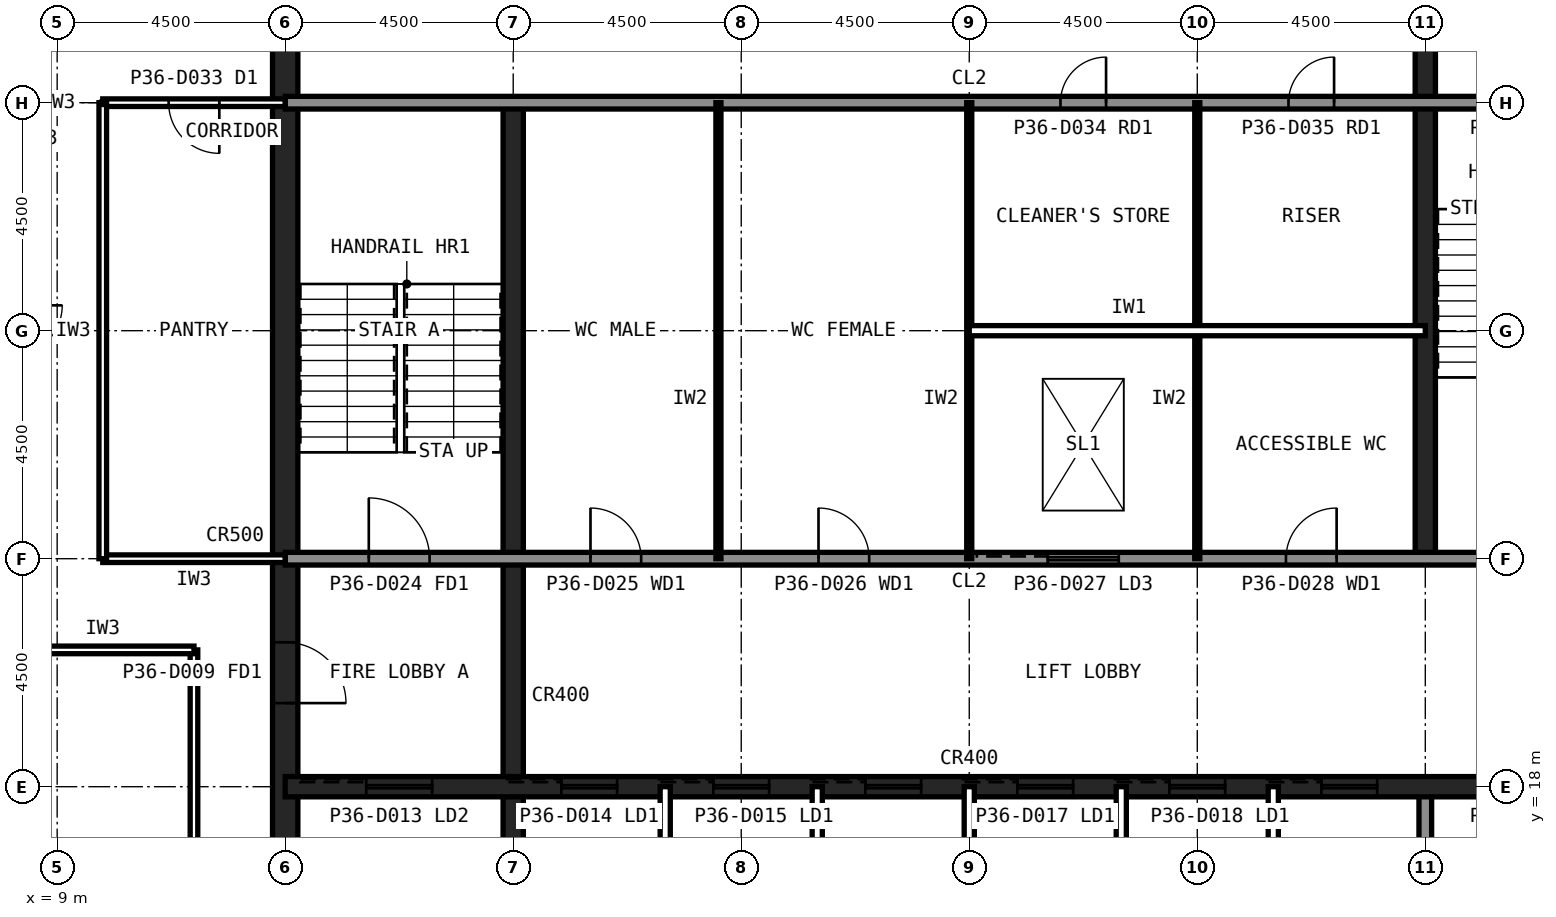
"""IFC4 building model, lengths in metres.
Left out: names, types, materials, properties, quantities, classifications, styles, units other than length and angle.
Written with IfcOpenShell. Run it as: python <this file> out.ifc"""

import sys

from ifc_helpers import new_model, si_unit, direction, frame, frame_2d, origin, place, context, subcontext, project, spatial, rectangle, extrude, element, fill, save


model = new_model("IFC4")
c1 = context("Model", 3, precision=1e-05, world=origin(), true_north=direction((0.0, 1.0)))
c2 = subcontext(c1, "Body", "Model", "MODEL_VIEW")
j1 = project(units=[si_unit("LENGTHUNIT", "METRE"), si_unit("PLANEANGLEUNIT", "RADIAN")], contexts=[c1])
p1 = place(None, origin())
s1 = spatial("IfcSite", under=j1, at=p1, CompositionType="ELEMENT")
p2 = place(p1, origin())
s2 = spatial("IfcBuilding", under=s1, at=p2, CompositionType="ELEMENT")
p3 = place(p2, frame((0.0, 0.0, 151.6)))
s3 = spatial("IfcBuildingStorey", under=s2, at=p3, CompositionType="ELEMENT", Elevation=151.6)
p4 = place(p3, frame((13.5, 40.5, 0.0), z_axis=(0.0, 0.0, 1.0), x_axis=(0.0, -1.0, 0.0)))
e1 = element("IfcWall", 1, at=p4, inside=s3, PredefinedType="SHEAR", context=c2, shape_type="SweptSolid", body=[
    extrude(rectangle(XDim=27.0, YDim=0.5, at=frame_2d((13.5, 0.0))), origin(), (0.0, 0.0, 1.0), 4.0),
])
p5 = place(p4, frame((19.65, 0.0, 0.0)))
e2 = element("IfcOpeningElement", 2, at=p5, cuts=e1, PredefinedType="OPENING", context=c2, shape_type="SweptSolid", body=[
    extrude(rectangle(XDim=1.2, YDim=2.1, at=frame_2d((0.6, 1.05))), frame((0.0, 0.26, 0.0), z_axis=(0.0, -1.0, 0.0), x_axis=(1.0, 0.0, 0.0)), (0.0, 0.0, 1.0), 0.52),
])
p6 = place(p4, frame((5.85, 0.0, 0.0)))
e3 = element("IfcOpeningElement", 3, at=p6, cuts=e1, PredefinedType="OPENING", context=c2, shape_type="SweptSolid", body=[
    extrude(rectangle(XDim=1.8, YDim=2.1, at=frame_2d((0.9, 1.05))), frame((0.0, 0.26, 0.0), z_axis=(0.0, -1.0, 0.0), x_axis=(1.0, 0.0, 0.0)), (0.0, 0.0, 1.0), 0.52),
])
p7 = place(p3, frame((18.0, 13.5, 0.0), z_axis=(0.0, 0.0, 1.0), x_axis=(0.0, 1.0, 0.0)))
e4 = element("IfcWall", 4, at=p7, inside=s3, PredefinedType="SHEAR", context=c2, shape_type="SweptSolid", body=[
    extrude(rectangle(XDim=18.0, YDim=0.4, at=frame_2d((9.0, 0.0))), origin(), (0.0, 0.0, 1.0), 4.0),
])
p8 = place(p3, frame((36.0, 13.5, 0.0), z_axis=(0.0, 0.0, 1.0), x_axis=(0.0, 1.0, 0.0)))
e5 = element("IfcWall", 5, at=p8, inside=s3, PredefinedType="SOLIDWALL", context=c2, shape_type="SweptSolid", body=[
    extrude(rectangle(XDim=4.5, YDim=0.25, at=frame_2d((2.25, 0.0))), origin(), (0.0, 0.0, 1.0), 3.84),
])
p9 = place(p3, frame((36.0, 22.5, 0.0), z_axis=(0.0, 0.0, 1.0), x_axis=(0.0, 1.0, 0.0)))
e6 = element("IfcWall", 6, at=p9, inside=s3, PredefinedType="SHEAR", context=c2, shape_type="SweptSolid", body=[
    extrude(rectangle(XDim=18.0, YDim=0.4, at=frame_2d((9.0, 0.0))), origin(), (0.0, 0.0, 1.0), 4.0),
])
p10 = place(p3, frame((13.5, 18.0, 0.0), z_axis=(0.0, 0.0, 1.0), x_axis=(1.0, 0.0, 0.0)))
e7 = element("IfcWall", 7, at=p10, inside=s3, PredefinedType="SHEAR", context=c2, shape_type="SweptSolid", body=[
    extrude(rectangle(XDim=27.0, YDim=0.4, at=frame_2d((13.5, 0.0))), origin(), (0.0, 0.0, 1.0), 4.0),
])
p11 = place(p10, frame((24.3, 0.0, 0.0)))
e8 = element("IfcOpeningElement", 8, at=p11, cuts=e7, PredefinedType="OPENING", context=c2, shape_type="SweptSolid", body=[
    extrude(rectangle(XDim=0.9, YDim=2.1, at=frame_2d((0.45, 1.05))), frame((0.0, 0.21, 0.0), z_axis=(0.0, -1.0, 0.0), x_axis=(1.0, 0.0, 0.0)), (0.0, 0.0, 1.0), 0.42),
])
p12 = place(p10, frame((5.45, 0.0, 0.0)))
e9 = element("IfcOpeningElement", 9, at=p12, cuts=e7, PredefinedType="OPENING", context=c2, shape_type="SweptSolid", body=[
    extrude(rectangle(XDim=1.1, YDim=2.1, at=frame_2d((0.55, 1.05))), frame((0.0, 0.21, 0.0), z_axis=(0.0, -1.0, 0.0), x_axis=(1.0, 0.0, 0.0)), (0.0, 0.0, 1.0), 0.42),
])
p13 = place(p10, frame((8.45, 0.0, 0.0)))
e10 = element("IfcOpeningElement", 10, at=p13, cuts=e7, PredefinedType="OPENING", context=c2, shape_type="SweptSolid", body=[
    extrude(rectangle(XDim=1.1, YDim=2.1, at=frame_2d((0.55, 1.05))), frame((0.0, 0.21, 0.0), z_axis=(0.0, -1.0, 0.0), x_axis=(1.0, 0.0, 0.0)), (0.0, 0.0, 1.0), 0.42),
])
p14 = place(p10, frame((11.45, 0.0, 0.0)))
e11 = element("IfcOpeningElement", 11, at=p14, cuts=e7, PredefinedType="OPENING", context=c2, shape_type="SweptSolid", body=[
    extrude(rectangle(XDim=1.1, YDim=2.1, at=frame_2d((0.55, 1.05))), frame((0.0, 0.21, 0.0), z_axis=(0.0, -1.0, 0.0), x_axis=(1.0, 0.0, 0.0)), (0.0, 0.0, 1.0), 0.42),
])
p15 = place(p10, frame((14.45, 0.0, 0.0)))
e12 = element("IfcOpeningElement", 12, at=p15, cuts=e7, PredefinedType="OPENING", context=c2, shape_type="SweptSolid", body=[
    extrude(rectangle(XDim=1.1, YDim=2.1, at=frame_2d((0.55, 1.05))), frame((0.0, 0.21, 0.0), z_axis=(0.0, -1.0, 0.0), x_axis=(1.0, 0.0, 0.0)), (0.0, 0.0, 1.0), 0.42),
])
p16 = place(p10, frame((17.45, 0.0, 0.0)))
e13 = element("IfcOpeningElement", 13, at=p16, cuts=e7, PredefinedType="OPENING", context=c2, shape_type="SweptSolid", body=[
    extrude(rectangle(XDim=1.1, YDim=2.1, at=frame_2d((0.55, 1.05))), frame((0.0, 0.21, 0.0), z_axis=(0.0, -1.0, 0.0), x_axis=(1.0, 0.0, 0.0)), (0.0, 0.0, 1.0), 0.42),
])
p17 = place(p10, frame((20.45, 0.0, 0.0)))
e14 = element("IfcOpeningElement", 14, at=p17, cuts=e7, PredefinedType="OPENING", context=c2, shape_type="SweptSolid", body=[
    extrude(rectangle(XDim=1.1, YDim=2.1, at=frame_2d((0.55, 1.05))), frame((0.0, 0.21, 0.0), z_axis=(0.0, -1.0, 0.0), x_axis=(1.0, 0.0, 0.0)), (0.0, 0.0, 1.0), 0.42),
])
p18 = place(p10, frame((1.6, 0.0, 0.0)))
e15 = element("IfcOpeningElement", 15, at=p18, cuts=e7, PredefinedType="OPENING", context=c2, shape_type="SweptSolid", body=[
    extrude(rectangle(XDim=1.3, YDim=2.2, at=frame_2d((0.65, 1.1))), frame((0.0, 0.21, 0.0), z_axis=(0.0, -1.0, 0.0), x_axis=(1.0, 0.0, 0.0)), (0.0, 0.0, 1.0), 0.42),
])
p19 = place(p3, frame((13.5, 22.5, 0.0), z_axis=(0.0, 0.0, 1.0), x_axis=(1.0, 0.0, 0.0)))
e16 = element("IfcWall", 16, at=p19, inside=s3, PredefinedType="SOLIDWALL", context=c2, shape_type="SweptSolid", body=[
    extrude(rectangle(XDim=27.0, YDim=0.25, at=frame_2d((13.5, 0.0))), origin(), (0.0, 0.0, 1.0), 3.84),
])
p20 = place(p19, frame((1.65, 0.0, 0.0)))
e17 = element("IfcOpeningElement", 17, at=p20, cuts=e16, PredefinedType="OPENING", context=c2, shape_type="SweptSolid", body=[
    extrude(rectangle(XDim=1.2, YDim=2.1, at=frame_2d((0.6, 1.05))), frame((0.0, 0.135, 0.0), z_axis=(0.0, -1.0, 0.0), x_axis=(1.0, 0.0, 0.0)), (0.0, 0.0, 1.0), 0.27),
])
p21 = place(p19, frame((6.025, 0.0, 0.0)))
e18 = element("IfcOpeningElement", 18, at=p21, cuts=e16, PredefinedType="OPENING", context=c2, shape_type="SweptSolid", body=[
    extrude(rectangle(XDim=1.0, YDim=2.1, at=frame_2d((0.5, 1.05))), frame((0.0, 0.135, 0.0), z_axis=(0.0, -1.0, 0.0), x_axis=(1.0, 0.0, 0.0)), (0.0, 0.0, 1.0), 0.27),
])
p22 = place(p19, frame((10.525, 0.0, 0.0)))
e19 = element("IfcOpeningElement", 19, at=p22, cuts=e16, PredefinedType="OPENING", context=c2, shape_type="SweptSolid", body=[
    extrude(rectangle(XDim=1.0, YDim=2.1, at=frame_2d((0.5, 1.05))), frame((0.0, 0.135, 0.0), z_axis=(0.0, -1.0, 0.0), x_axis=(1.0, 0.0, 0.0)), (0.0, 0.0, 1.0), 0.27),
])
p23 = place(p19, frame((19.75, 0.0, 0.0)))
e20 = element("IfcOpeningElement", 20, at=p23, cuts=e16, PredefinedType="OPENING", context=c2, shape_type="SweptSolid", body=[
    extrude(rectangle(XDim=1.0, YDim=2.1, at=frame_2d((0.5, 1.05))), frame((0.0, 0.135, 0.0), z_axis=(0.0, -1.0, 0.0), x_axis=(1.0, 0.0, 0.0)), (0.0, 0.0, 1.0), 0.27),
])
p24 = place(p19, frame((15.05, 0.0, 0.0)))
e21 = element("IfcOpeningElement", 21, at=p24, cuts=e16, PredefinedType="OPENING", context=c2, shape_type="SweptSolid", body=[
    extrude(rectangle(XDim=1.4, YDim=2.4, at=frame_2d((0.7, 1.2))), frame((0.0, 0.135, 0.0), z_axis=(0.0, -1.0, 0.0), x_axis=(1.0, 0.0, 0.0)), (0.0, 0.0, 1.0), 0.27),
])
p25 = place(p3, frame((13.5, 31.5, 0.0), z_axis=(0.0, 0.0, 1.0), x_axis=(1.0, 0.0, 0.0)))
e22 = element("IfcWall", 22, at=p25, inside=s3, PredefinedType="SOLIDWALL", context=c2, shape_type="SweptSolid", body=[
    extrude(rectangle(XDim=27.0, YDim=0.25, at=frame_2d((13.5, 0.0))), origin(), (0.0, 0.0, 1.0), 3.84),
])
p26 = place(p25, frame((24.15, 0.0, 0.0)))
e23 = element("IfcOpeningElement", 23, at=p26, cuts=e22, PredefinedType="OPENING", context=c2, shape_type="SweptSolid", body=[
    extrude(rectangle(XDim=1.2, YDim=2.1, at=frame_2d((0.6, 1.05))), frame((0.0, 0.135, 0.0), z_axis=(0.0, -1.0, 0.0), x_axis=(1.0, 0.0, 0.0)), (0.0, 0.0, 1.0), 0.27),
])
p27 = place(p25, frame((15.3, 0.0, 0.0)))
e24 = element("IfcOpeningElement", 24, at=p27, cuts=e22, PredefinedType="OPENING", context=c2, shape_type="SweptSolid", body=[
    extrude(rectangle(XDim=0.9, YDim=2.1, at=frame_2d((0.45, 1.05))), frame((0.0, 0.135, 0.0), z_axis=(0.0, -1.0, 0.0), x_axis=(1.0, 0.0, 0.0)), (0.0, 0.0, 1.0), 0.27),
])
p28 = place(p25, frame((19.8, 0.0, 0.0)))
e25 = element("IfcOpeningElement", 25, at=p28, cuts=e22, PredefinedType="OPENING", context=c2, shape_type="SweptSolid", body=[
    extrude(rectangle(XDim=0.9, YDim=2.1, at=frame_2d((0.45, 1.05))), frame((0.0, 0.135, 0.0), z_axis=(0.0, -1.0, 0.0), x_axis=(1.0, 0.0, 0.0)), (0.0, 0.0, 1.0), 0.27),
])
for number, where, z_axis, x_axis in (
    (26, (21.0, 13.5, 0.0), (0.0, 0.0, 1.0), (0.0, 1.0, 0.0)),
    (27, (24.0, 13.5, 0.0), (0.0, 0.0, 1.0), (0.0, 1.0, 0.0)),
    (28, (27.0, 13.5, 0.0), (0.0, 0.0, 1.0), (0.0, 1.0, 0.0)),
    (29, (30.0, 13.5, 0.0), (0.0, 0.0, 1.0), (0.0, 1.0, 0.0)),
    (30, (33.0, 13.5, 0.0), (0.0, 0.0, 1.0), (0.0, 1.0, 0.0)),
):
    element("IfcWall", number, at=place(p3, frame(where, z_axis=z_axis, x_axis=x_axis)), inside=s3, PredefinedType="PARTITIONING", context=c2, shape_type="SweptSolid", body=[
        extrude(rectangle(XDim=4.5, YDim=0.2, at=frame_2d((2.25, 0.0))), origin(), (0.0, 0.0, 1.0), 3.84),
    ])
for number, where, z_axis, x_axis in (
    (31, (22.05, 22.5, 0.0), (0.0, 0.0, 1.0), (0.0, 1.0, 0.0)),
    (32, (27.0, 22.5, 0.0), (0.0, 0.0, 1.0), (0.0, 1.0, 0.0)),
    (33, (31.5, 22.5, 0.0), (0.0, 0.0, 1.0), (0.0, 1.0, 0.0)),
):
    element("IfcWall", number, at=place(p3, frame(where, z_axis=z_axis, x_axis=x_axis)), inside=s3, PredefinedType="PLUMBINGWALL", context=c2, shape_type="SweptSolid", body=[
        extrude(rectangle(XDim=9.0, YDim=0.1, at=frame_2d((4.5, 0.0))), origin(), (0.0, 0.0, 1.0), 3.84),
    ])
p29 = place(p3, frame((27.0, 27.0, 0.0), z_axis=(0.0, 0.0, 1.0), x_axis=(1.0, 0.0, 0.0)))
e34 = element("IfcWall", 34, at=p29, inside=s3, PredefinedType="PARTITIONING", context=c2, shape_type="SweptSolid", body=[
    extrude(rectangle(XDim=9.0, YDim=0.2, at=frame_2d((4.5, 0.0))), origin(), (0.0, 0.0, 1.0), 3.84),
])
p30 = place(p3, frame((11.7, 20.7, 0.0), z_axis=(0.0, 0.0, 1.0), x_axis=(0.0, -1.0, 0.0)))
e35 = element("IfcWall", 35, at=p30, inside=s3, PredefinedType="PARTITIONING", context=c2, shape_type="SweptSolid", body=[
    extrude(rectangle(XDim=9.0, YDim=0.15, at=frame_2d((4.5, 0.0))), origin(), (0.0, 0.0, 1.0), 3.84),
])
p31 = place(p3, frame((8.1, 20.7, 0.0), z_axis=(0.0, 0.0, 1.0), x_axis=(1.0, 0.0, 0.0)))
e36 = element("IfcWall", 36, at=p31, inside=s3, PredefinedType="PARTITIONING", context=c2, shape_type="SweptSolid", body=[
    extrude(rectangle(XDim=3.6, YDim=0.15, at=frame_2d((1.8, 0.0))), origin(), (0.0, 0.0, 1.0), 3.84),
])
p32 = place(p3, frame((9.9, 22.5, 0.0), z_axis=(0.0, 0.0, 1.0), x_axis=(1.0, 0.0, 0.0)))
e37 = element("IfcWall", 37, at=p32, inside=s3, PredefinedType="PARTITIONING", context=c2, shape_type="SweptSolid", body=[
    extrude(rectangle(XDim=3.6, YDim=0.15, at=frame_2d((1.8, 0.0))), origin(), (0.0, 0.0, 1.0), 2.989),
])
p33 = place(p3, frame((13.5, 31.5, 0.0), z_axis=(0.0, 0.0, 1.0), x_axis=(-1.0, 0.0, 0.0)))
e38 = element("IfcWall", 38, at=p33, inside=s3, PredefinedType="PARTITIONING", context=c2, shape_type="SweptSolid", body=[
    extrude(rectangle(XDim=3.6, YDim=0.15, at=frame_2d((1.8, 0.0))), origin(), (0.0, 0.0, 1.0), 2.989),
])
p34 = place(p33, frame((1.3, 0.0, 0.0)))
e39 = element("IfcOpeningElement", 39, at=p34, cuts=e38, PredefinedType="OPENING", context=c2, shape_type="SweptSolid", body=[
    extrude(rectangle(XDim=1.0, YDim=2.1, at=frame_2d((0.5, 1.05))), frame((0.0, 0.085, 0.0), z_axis=(0.0, -1.0, 0.0), x_axis=(1.0, 0.0, 0.0)), (0.0, 0.0, 1.0), 0.17),
])
p35 = place(p3, frame((9.9, 31.5, 0.0), z_axis=(0.0, 0.0, 1.0), x_axis=(0.0, -1.0, 0.0)))
e40 = element("IfcWall", 40, at=p35, inside=s3, PredefinedType="PARTITIONING", context=c2, shape_type="SweptSolid", body=[
    extrude(rectangle(XDim=9.0, YDim=0.15, at=frame_2d((4.5, 0.0))), origin(), (0.0, 0.0, 1.0), 3.84),
])
p36 = place(p5, origin())
e41 = element("IfcDoor", 41, at=p36, inside=s3, OperationType="SINGLE_SWING_RIGHT", PredefinedType="DOOR", context=c2, shape_type="SweptSolid", body=[
    extrude(rectangle(XDim=1.2, YDim=2.1, at=frame_2d((0.6, 1.05))), frame((0.0, 0.025, 0.0), z_axis=(0.0, -1.0, 0.0), x_axis=(1.0, 0.0, 0.0)), (0.0, 0.0, 1.0), 0.05),
])
fill(e2, e41)
p37 = place(p20, origin())
e42 = element("IfcDoor", 42, at=p37, inside=s3, OperationType="SINGLE_SWING_LEFT", PredefinedType="DOOR", context=c2, shape_type="SweptSolid", body=[
    extrude(rectangle(XDim=1.2, YDim=2.1, at=frame_2d((0.6, 1.05))), frame((0.0, 0.025, 0.0), z_axis=(0.0, -1.0, 0.0), x_axis=(1.0, 0.0, 0.0)), (0.0, 0.0, 1.0), 0.05),
])
fill(e17, e42)
p38 = place(p21, origin())
e43 = element("IfcDoor", 43, at=p38, inside=s3, OperationType="SINGLE_SWING_LEFT", PredefinedType="DOOR", context=c2, shape_type="SweptSolid", body=[
    extrude(rectangle(XDim=1.0, YDim=2.1, at=frame_2d((0.5, 1.05))), frame((0.0, 0.025, 0.0), z_axis=(0.0, -1.0, 0.0), x_axis=(1.0, 0.0, 0.0)), (0.0, 0.0, 1.0), 0.05),
])
fill(e18, e43)
p39 = place(p22, origin())
e44 = element("IfcDoor", 44, at=p39, inside=s3, OperationType="SINGLE_SWING_LEFT", PredefinedType="DOOR", context=c2, shape_type="SweptSolid", body=[
    extrude(rectangle(XDim=1.0, YDim=2.1, at=frame_2d((0.5, 1.05))), frame((0.0, 0.025, 0.0), z_axis=(0.0, -1.0, 0.0), x_axis=(1.0, 0.0, 0.0)), (0.0, 0.0, 1.0), 0.05),
])
fill(e19, e44)
p40 = place(p23, origin())
e45 = element("IfcDoor", 45, at=p40, inside=s3, OperationType="SINGLE_SWING_RIGHT", PredefinedType="DOOR", context=c2, shape_type="SweptSolid", body=[
    extrude(rectangle(XDim=1.0, YDim=2.1, at=frame_2d((0.5, 1.05))), frame((0.0, 0.025, 0.0), z_axis=(0.0, -1.0, 0.0), x_axis=(1.0, 0.0, 0.0)), (0.0, 0.0, 1.0), 0.05),
])
fill(e20, e45)
p41 = place(p27, origin())
e46 = element("IfcDoor", 46, at=p41, inside=s3, OperationType="SINGLE_SWING_RIGHT", PredefinedType="DOOR", context=c2, shape_type="SweptSolid", body=[
    extrude(rectangle(XDim=0.9, YDim=2.1, at=frame_2d((0.45, 1.05))), frame((0.0, 0.025, 0.0), z_axis=(0.0, -1.0, 0.0), x_axis=(1.0, 0.0, 0.0)), (0.0, 0.0, 1.0), 0.05),
])
fill(e24, e46)
p42 = place(p28, origin())
e47 = element("IfcDoor", 47, at=p42, inside=s3, OperationType="SINGLE_SWING_RIGHT", PredefinedType="DOOR", context=c2, shape_type="SweptSolid", body=[
    extrude(rectangle(XDim=0.9, YDim=2.1, at=frame_2d((0.45, 1.05))), frame((0.0, 0.025, 0.0), z_axis=(0.0, -1.0, 0.0), x_axis=(1.0, 0.0, 0.0)), (0.0, 0.0, 1.0), 0.05),
])
fill(e25, e47)
p43 = place(p12, origin())
e48 = element("IfcDoor", 48, at=p43, inside=s3, OperationType="SLIDING_TO_LEFT", PredefinedType="DOOR", context=c2, shape_type="SweptSolid", body=[
    extrude(rectangle(XDim=1.1, YDim=2.1, at=frame_2d((0.55, 1.05))), frame((0.0, 0.025, 0.0), z_axis=(0.0, -1.0, 0.0), x_axis=(1.0, 0.0, 0.0)), (0.0, 0.0, 1.0), 0.05),
])
fill(e9, e48)
p44 = place(p13, origin())
e49 = element("IfcDoor", 49, at=p44, inside=s3, OperationType="SLIDING_TO_LEFT", PredefinedType="DOOR", context=c2, shape_type="SweptSolid", body=[
    extrude(rectangle(XDim=1.1, YDim=2.1, at=frame_2d((0.55, 1.05))), frame((0.0, 0.025, 0.0), z_axis=(0.0, -1.0, 0.0), x_axis=(1.0, 0.0, 0.0)), (0.0, 0.0, 1.0), 0.05),
])
fill(e10, e49)
p45 = place(p14, origin())
e50 = element("IfcDoor", 50, at=p45, inside=s3, OperationType="SLIDING_TO_LEFT", PredefinedType="DOOR", context=c2, shape_type="SweptSolid", body=[
    extrude(rectangle(XDim=1.1, YDim=2.1, at=frame_2d((0.55, 1.05))), frame((0.0, 0.025, 0.0), z_axis=(0.0, -1.0, 0.0), x_axis=(1.0, 0.0, 0.0)), (0.0, 0.0, 1.0), 0.05),
])
fill(e11, e50)
p46 = place(p15, origin())
e51 = element("IfcDoor", 51, at=p46, inside=s3, OperationType="SLIDING_TO_LEFT", PredefinedType="DOOR", context=c2, shape_type="SweptSolid", body=[
    extrude(rectangle(XDim=1.1, YDim=2.1, at=frame_2d((0.55, 1.05))), frame((0.0, 0.025, 0.0), z_axis=(0.0, -1.0, 0.0), x_axis=(1.0, 0.0, 0.0)), (0.0, 0.0, 1.0), 0.05),
])
fill(e12, e51)
p47 = place(p16, origin())
e52 = element("IfcDoor", 52, at=p47, inside=s3, OperationType="SLIDING_TO_LEFT", PredefinedType="DOOR", context=c2, shape_type="SweptSolid", body=[
    extrude(rectangle(XDim=1.1, YDim=2.1, at=frame_2d((0.55, 1.05))), frame((0.0, 0.025, 0.0), z_axis=(0.0, -1.0, 0.0), x_axis=(1.0, 0.0, 0.0)), (0.0, 0.0, 1.0), 0.05),
])
fill(e13, e52)
p48 = place(p17, origin())
e53 = element("IfcDoor", 53, at=p48, inside=s3, OperationType="SLIDING_TO_LEFT", PredefinedType="DOOR", context=c2, shape_type="SweptSolid", body=[
    extrude(rectangle(XDim=1.1, YDim=2.1, at=frame_2d((0.55, 1.05))), frame((0.0, 0.025, 0.0), z_axis=(0.0, -1.0, 0.0), x_axis=(1.0, 0.0, 0.0)), (0.0, 0.0, 1.0), 0.05),
])
fill(e14, e53)
p49 = place(p18, origin())
e54 = element("IfcDoor", 54, at=p49, inside=s3, OperationType="SLIDING_TO_LEFT", PredefinedType="DOOR", context=c2, shape_type="SweptSolid", body=[
    extrude(rectangle(XDim=1.3, YDim=2.2, at=frame_2d((0.65, 1.1))), frame((0.0, 0.025, 0.0), z_axis=(0.0, -1.0, 0.0), x_axis=(1.0, 0.0, 0.0)), (0.0, 0.0, 1.0), 0.05),
])
fill(e15, e54)
p50 = place(p24, origin())
e55 = element("IfcDoor", 55, at=p50, inside=s3, OperationType="SLIDING_TO_LEFT", PredefinedType="DOOR", context=c2, shape_type="SweptSolid", body=[
    extrude(rectangle(XDim=1.4, YDim=2.4, at=frame_2d((0.7, 1.2))), frame((0.0, 0.025, 0.0), z_axis=(0.0, -1.0, 0.0), x_axis=(1.0, 0.0, 0.0)), (0.0, 0.0, 1.0), 0.05),
])
fill(e21, e55)
p51 = place(p34, origin())
e56 = element("IfcDoor", 56, at=p51, inside=s3, OperationType="SINGLE_SWING_LEFT", PredefinedType="DOOR", context=c2, shape_type="SweptSolid", body=[
    extrude(rectangle(XDim=1.0, YDim=2.1, at=frame_2d((0.5, 1.05))), frame((0.0, 0.025, 0.0), z_axis=(0.0, -1.0, 0.0), x_axis=(1.0, 0.0, 0.0)), (0.0, 0.0, 1.0), 0.05),
])
fill(e39, e56)
save(model, sys.argv[1])
